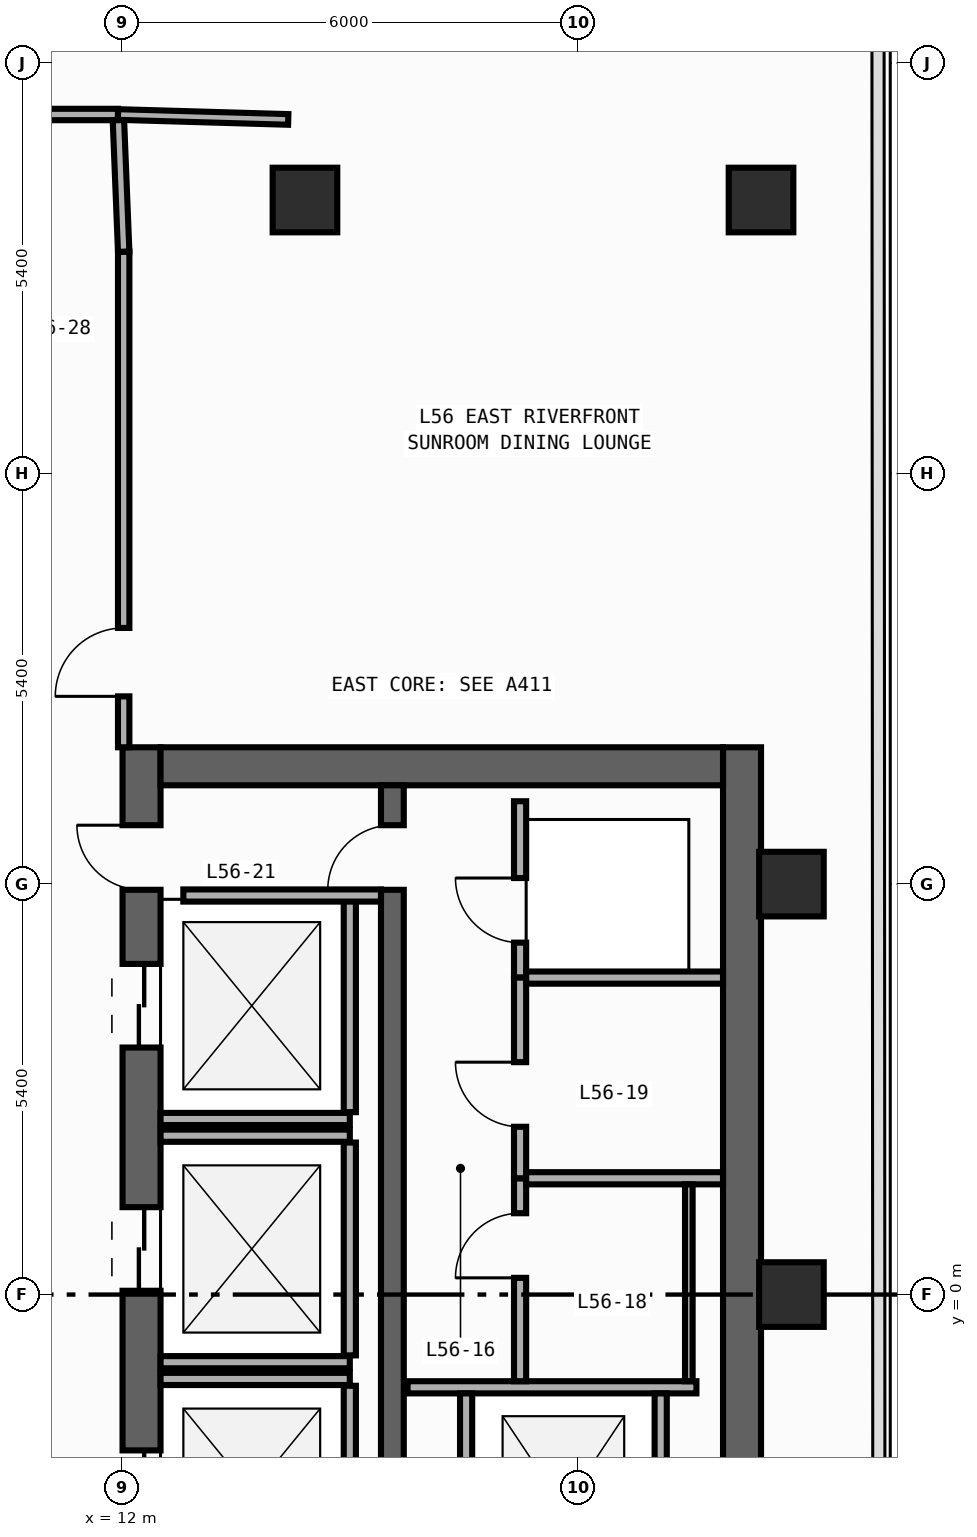
"""IFC4 building model, lengths in metres.
Left out: names, types, materials, properties, quantities, classifications, styles, units other than length and angle.
Written with IfcOpenShell. Run it as: python <this file> out.ifc"""

import sys

from ifc_helpers import new_model, si_unit, direction, frame, frame_2d, origin, origin_2d, place, context, subcontext, project, spatial, rectangle, extrude, element, fill, save


model = new_model("IFC4")
c1 = context("Model", 3, precision=1e-05, world=origin(), true_north=direction((0.0, 1.0)))
c2 = subcontext(c1, "Body", "Model", "MODEL_VIEW")
j1 = project(units=[si_unit("LENGTHUNIT", "METRE"), si_unit("PLANEANGLEUNIT", "RADIAN")], contexts=[c1])
p1 = place(None, origin())
s1 = spatial("IfcSite", under=j1, at=p1, CompositionType="ELEMENT")
p2 = place(p1, origin())
s2 = spatial("IfcBuilding", under=s1, at=p2, CompositionType="ELEMENT")
p3 = place(p2, frame((0.0, 0.0, 240.4)))
s3 = spatial("IfcBuildingStorey", under=s2, at=p3, CompositionType="ELEMENT", Elevation=240.4)
p4 = place(p3, frame((12.25, -19.8, 0.0), z_axis=(0.0, 0.0, 1.0), x_axis=(0.0, 1.0, 0.0)))
e1 = element("IfcWall", 1, at=p4, inside=s3, PredefinedType="SHEAR", context=c2, shape_type="SweptSolid", body=[
    extrude(rectangle(XDim=27.0, YDim=0.5, at=frame_2d((13.5, 0.0))), origin(), (0.0, 0.0, 1.0), 3.34),
])
p5 = place(p4, frame((23.05, 0.0, 0.0)))
e2 = element("IfcOpeningElement", 2, at=p5, cuts=e1, PredefinedType="OPENING", context=c2, shape_type="SweptSolid", body=[
    extrude(rectangle(XDim=1.1, YDim=2.2, at=frame_2d((0.55, 1.1))), frame((0.0, 0.26, 0.0), z_axis=(0.0, -1.0, 0.0), x_axis=(1.0, 0.0, 0.0)), (0.0, 0.0, 1.0), 0.52),
])
p6 = place(p4, frame((19.85, 0.0, 0.0)))
e3 = element("IfcOpeningElement", 3, at=p6, cuts=e1, PredefinedType="OPENING", context=c2, shape_type="SweptSolid", body=[
    extrude(rectangle(XDim=1.1, YDim=2.2, at=frame_2d((0.55, 1.1))), frame((0.0, 0.26, 0.0), z_axis=(0.0, -1.0, 0.0), x_axis=(1.0, 0.0, 0.0)), (0.0, 0.0, 1.0), 0.52),
])
p7 = place(p4, frame((16.65, 0.0, 0.0)))
e4 = element("IfcOpeningElement", 4, at=p7, cuts=e1, PredefinedType="OPENING", context=c2, shape_type="SweptSolid", body=[
    extrude(rectangle(XDim=1.1, YDim=2.2, at=frame_2d((0.55, 1.1))), frame((0.0, 0.26, 0.0), z_axis=(0.0, -1.0, 0.0), x_axis=(1.0, 0.0, 0.0)), (0.0, 0.0, 1.0), 0.52),
])
p8 = place(p4, frame((7.175, 0.0, 0.0)))
e5 = element("IfcOpeningElement", 5, at=p8, cuts=e1, PredefinedType="OPENING", context=c2, shape_type="SweptSolid", body=[
    extrude(rectangle(XDim=0.85, YDim=2.1, at=frame_2d((0.425, 1.05))), frame((0.0, 0.26, 0.0), z_axis=(0.0, -1.0, 0.0), x_axis=(1.0, 0.0, 0.0)), (0.0, 0.0, 1.0), 0.52),
])
p9 = place(p4, frame((10.375, 0.0, 0.0)))
e6 = element("IfcOpeningElement", 6, at=p9, cuts=e1, PredefinedType="OPENING", context=c2, shape_type="SweptSolid", body=[
    extrude(rectangle(XDim=0.85, YDim=2.1, at=frame_2d((0.425, 1.05))), frame((0.0, 0.26, 0.0), z_axis=(0.0, -1.0, 0.0), x_axis=(1.0, 0.0, 0.0)), (0.0, 0.0, 1.0), 0.52),
])
p10 = place(p4, frame((12.725, 0.0, 0.0)))
e7 = element("IfcOpeningElement", 7, at=p10, cuts=e1, PredefinedType="OPENING", context=c2, shape_type="SweptSolid", body=[
    extrude(rectangle(XDim=1.15, YDim=2.2, at=frame_2d((0.575, 1.1))), frame((0.0, 0.26, 0.0), z_axis=(0.0, -1.0, 0.0), x_axis=(1.0, 0.0, 0.0)), (0.0, 0.0, 1.0), 0.52),
])
p11 = place(p4, frame((25.125, 0.0, 0.0)))
e8 = element("IfcOpeningElement", 8, at=p11, cuts=e1, PredefinedType="OPENING", context=c2, shape_type="SweptSolid", body=[
    extrude(rectangle(XDim=0.85, YDim=2.1, at=frame_2d((0.425, 1.05))), frame((0.0, 0.26, 0.0), z_axis=(0.0, -1.0, 0.0), x_axis=(1.0, 0.0, 0.0)), (0.0, 0.0, 1.0), 0.52),
])
p12 = place(p3, frame((20.15, -19.8, 0.0), z_axis=(0.0, 0.0, 1.0), x_axis=(0.0, 1.0, 0.0)))
e9 = element("IfcWall", 9, at=p12, inside=s3, PredefinedType="SHEAR", context=c2, shape_type="SweptSolid", body=[
    extrude(rectangle(XDim=27.0, YDim=0.5, at=frame_2d((13.5, 0.0))), origin(), (0.0, 0.0, 1.0), 3.34),
])
p13 = place(p3, frame((12.5, 6.95, 0.0), z_axis=(0.0, 0.0, 1.0), x_axis=(1.0, 0.0, 0.0)))
e10 = element("IfcWall", 10, at=p13, inside=s3, PredefinedType="SHEAR", context=c2, shape_type="SweptSolid", body=[
    extrude(rectangle(XDim=7.4, YDim=0.5, at=frame_2d((3.7, 0.0))), origin(), (0.0, 0.0, 1.0), 3.34),
])
p14 = place(p3, frame((15.55, -19.3, 0.0), z_axis=(0.0, 0.0, 1.0), x_axis=(0.0, 1.0, 0.0)))
e11 = element("IfcWall", 11, at=p14, inside=s3, PredefinedType="SHEAR", context=c2, shape_type="SweptSolid", body=[
    extrude(rectangle(XDim=26.0, YDim=0.3, at=frame_2d((13.0, 0.0))), origin(), (0.0, 0.0, 1.0), 3.34),
])
p15 = place(p14, frame((12.225, 0.0, 0.0)))
e12 = element("IfcOpeningElement", 12, at=p15, cuts=e11, PredefinedType="OPENING", context=c2, shape_type="SweptSolid", body=[
    extrude(rectangle(XDim=1.15, YDim=2.2, at=frame_2d((0.575, 1.1))), frame((0.0, 0.16, 0.0), z_axis=(0.0, -1.0, 0.0), x_axis=(1.0, 0.0, 0.0)), (0.0, 0.0, 1.0), 0.32),
])
p16 = place(p14, frame((24.625, 0.0, 0.0)))
e13 = element("IfcOpeningElement", 13, at=p16, cuts=e11, PredefinedType="OPENING", context=c2, shape_type="SweptSolid", body=[
    extrude(rectangle(XDim=0.85, YDim=2.1, at=frame_2d((0.425, 1.05))), frame((0.0, 0.16, 0.0), z_axis=(0.0, -1.0, 0.0), x_axis=(1.0, 0.0, 0.0)), (0.0, 0.0, 1.0), 0.32),
])
for number, where, z_axis, x_axis in (
    (14, (20.4, 14.4, 0.0), (0.0, 0.0, 1.0), (1.0, 0.0, 0.0)),
    (15, (14.4, 14.4, 0.0), (0.0, 0.0, 1.0), (1.0, 0.0, 0.0)),
    (16, (20.8, 0.0, 0.0), (0.0, 0.0, 1.0), (1.0, 0.0, 0.0)),
    (17, (20.8, 5.4, 0.0), (0.0, 0.0, 1.0), (1.0, 0.0, 0.0)),
):
    element("IfcColumn", number, at=place(p3, frame(where, z_axis=z_axis, x_axis=x_axis)), inside=s3, PredefinedType="COLUMN", context=c2, shape_type="SweptSolid", body=[
        extrude(rectangle(XDim=0.85, YDim=0.85, at=origin_2d()), origin(), (0.0, 0.0, 1.0), 3.6),
    ])
p17 = place(p3, frame((12.5, 2.31, 0.0), z_axis=(0.0, 0.0, 1.0), x_axis=(1.0, 0.0, 0.0)))
e18 = element("IfcWall", 18, at=p17, inside=s3, PredefinedType="STANDARD", context=c2, shape_type="SweptSolid", body=[
    extrude(rectangle(XDim=2.49, YDim=0.16, at=frame_2d((1.245, 0.0))), origin(), (0.0, 0.0, 1.0), 3.34),
])
p18 = place(p3, frame((14.99, 2.4, 0.0), z_axis=(0.0, 0.0, 1.0), x_axis=(0.0, 1.0, 0.0)))
e19 = element("IfcWall", 19, at=p18, inside=s3, PredefinedType="STANDARD", context=c2, shape_type="SweptSolid", body=[
    extrude(rectangle(XDim=2.8, YDim=0.16, at=frame_2d((1.4, 0.0))), origin(), (0.0, 0.0, 1.0), 3.34),
])
for number, where, z_axis, x_axis in (
    (20, (12.5, -0.89, 0.0), (0.0, 0.0, 1.0), (1.0, 0.0, 0.0)),
    (21, (12.5, 2.09, 0.0), (0.0, 0.0, 1.0), (1.0, 0.0, 0.0)),
):
    element("IfcWall", number, at=place(p3, frame(where, z_axis=z_axis, x_axis=x_axis)), inside=s3, PredefinedType="STANDARD", context=c2, shape_type="SweptSolid", body=[
        extrude(rectangle(XDim=2.49, YDim=0.16, at=frame_2d((1.245, 0.0))), origin(), (0.0, 0.0, 1.0), 3.34),
    ])
p19 = place(p3, frame((14.99, -0.8, 0.0), z_axis=(0.0, 0.0, 1.0), x_axis=(0.0, 1.0, 0.0)))
e22 = element("IfcWall", 22, at=p19, inside=s3, PredefinedType="STANDARD", context=c2, shape_type="SweptSolid", body=[
    extrude(rectangle(XDim=2.8, YDim=0.16, at=frame_2d((1.4, 0.0))), origin(), (0.0, 0.0, 1.0), 3.34),
])
p20 = place(p3, frame((12.5, -1.11, 0.0), z_axis=(0.0, 0.0, 1.0), x_axis=(1.0, 0.0, 0.0)))
e23 = element("IfcWall", 23, at=p20, inside=s3, PredefinedType="STANDARD", context=c2, shape_type="SweptSolid", body=[
    extrude(rectangle(XDim=2.49, YDim=0.16, at=frame_2d((1.245, 0.0))), origin(), (0.0, 0.0, 1.0), 3.34),
])
p21 = place(p3, frame((14.99, -4.0, 0.0), z_axis=(0.0, 0.0, 1.0), x_axis=(0.0, 1.0, 0.0)))
e24 = element("IfcWall", 24, at=p21, inside=s3, PredefinedType="STANDARD", context=c2, shape_type="SweptSolid", body=[
    extrude(rectangle(XDim=2.8, YDim=0.16, at=frame_2d((1.4, 0.0))), origin(), (0.0, 0.0, 1.0), 3.34),
])
p22 = place(p3, frame((15.75, -1.22, 0.0), z_axis=(0.0, 0.0, 1.0), x_axis=(1.0, 0.0, 0.0)))
e25 = element("IfcWall", 25, at=p22, inside=s3, PredefinedType="STANDARD", context=c2, shape_type="SweptSolid", body=[
    extrude(rectangle(XDim=3.8, YDim=0.16, at=frame_2d((1.9, 0.0))), origin(), (0.0, 0.0, 1.0), 3.34),
])
for number, where, z_axis, x_axis in (
    (26, (16.52, -4.28, 0.0), (0.0, 0.0, 1.0), (0.0, 1.0, 0.0)),
    (27, (19.08, -4.28, 0.0), (0.0, 0.0, 1.0), (0.0, 1.0, 0.0)),
):
    element("IfcWall", number, at=place(p3, frame(where, z_axis=z_axis, x_axis=x_axis)), inside=s3, PredefinedType="STANDARD", context=c2, shape_type="SweptSolid", body=[
        extrude(rectangle(XDim=2.98, YDim=0.16, at=frame_2d((1.49, 0.0))), origin(), (0.0, 0.0, 1.0), 3.34),
    ])
p23 = place(p3, frame((12.8, 5.25, 0.0), z_axis=(0.0, 0.0, 1.0), x_axis=(1.0, 0.0, 0.0)))
e28 = element("IfcWall", 28, at=p23, inside=s3, PredefinedType="STANDARD", context=c2, shape_type="SweptSolid", body=[
    extrude(rectangle(XDim=2.6, YDim=0.16, at=frame_2d((1.3, 0.0))), origin(), (0.0, 0.0, 1.0), 3.34),
])
p24 = place(p3, frame((17.23, 4.17, 0.0), z_axis=(0.0, 0.0, 1.0), x_axis=(0.0, 1.0, 0.0)))
e29 = element("IfcWall", 29, at=p24, inside=s3, PredefinedType="PARTITIONING", context=c2, shape_type="SweptSolid", body=[
    extrude(rectangle(XDim=2.32, YDim=0.16, at=frame_2d((1.16, 0.0))), origin(), (0.0, 0.0, 1.0), 3.34),
])
p25 = place(p24, frame((0.46, 0.0, 0.0)))
e30 = element("IfcOpeningElement", 30, at=p25, cuts=e29, PredefinedType="OPENING", context=c2, shape_type="SweptSolid", body=[
    extrude(rectangle(XDim=0.85, YDim=2.1, at=frame_2d((0.425, 1.05))), frame((0.0, 0.09, 0.0), z_axis=(0.0, -1.0, 0.0), x_axis=(1.0, 0.0, 0.0)), (0.0, 0.0, 1.0), 0.18),
])
p26 = place(p3, frame((17.23, -1.14, 0.0), z_axis=(0.0, 0.0, 1.0), x_axis=(0.0, 1.0, 0.0)))
e31 = element("IfcWall", 31, at=p26, inside=s3, PredefinedType="PARTITIONING", context=c2, shape_type="SweptSolid", body=[
    extrude(rectangle(XDim=2.67, YDim=0.16, at=frame_2d((1.335, 0.0))), origin(), (0.0, 0.0, 1.0), 3.34),
])
p27 = place(p26, frame((1.36, 0.0, 0.0)))
e32 = element("IfcOpeningElement", 32, at=p27, cuts=e31, PredefinedType="OPENING", context=c2, shape_type="SweptSolid", body=[
    extrude(rectangle(XDim=0.85, YDim=2.1, at=frame_2d((0.425, 1.05))), frame((0.0, 0.09, 0.0), z_axis=(0.0, -1.0, 0.0), x_axis=(1.0, 0.0, 0.0)), (0.0, 0.0, 1.0), 0.18),
])
p28 = place(p3, frame((17.23, 1.53, 0.0), z_axis=(0.0, 0.0, 1.0), x_axis=(0.0, 1.0, 0.0)))
e33 = element("IfcWall", 33, at=p28, inside=s3, PredefinedType="PARTITIONING", context=c2, shape_type="SweptSolid", body=[
    extrude(rectangle(XDim=2.64, YDim=0.16, at=frame_2d((1.32, 0.0))), origin(), (0.0, 0.0, 1.0), 3.34),
])
p29 = place(p28, frame((0.677, 0.0, 0.0)))
e34 = element("IfcOpeningElement", 34, at=p29, cuts=e33, PredefinedType="OPENING", context=c2, shape_type="SweptSolid", body=[
    extrude(rectangle(XDim=0.85, YDim=2.1, at=frame_2d((0.425, 1.05))), frame((0.0, 0.09, 0.0), z_axis=(0.0, -1.0, 0.0), x_axis=(1.0, 0.0, 0.0)), (0.0, 0.0, 1.0), 0.18),
])
for number, where, z_axis, x_axis in (
    (35, (17.31, 4.17, 0.0), (0.0, 0.0, 1.0), (1.0, 0.0, 0.0)),
    (36, (17.31, 1.53, 0.0), (0.0, 0.0, 1.0), (1.0, 0.0, 0.0)),
):
    element("IfcWall", number, at=place(p3, frame(where, z_axis=z_axis, x_axis=x_axis)), inside=s3, PredefinedType="PARTITIONING", context=c2, shape_type="SweptSolid", body=[
        extrude(rectangle(XDim=2.59, YDim=0.16, at=frame_2d((1.295, 0.0))), origin(), (0.0, 0.0, 1.0), 3.34),
    ])
p30 = place(p3, frame((12.015, 7.2, 0.0), z_axis=(0.0, 0.0, 1.0), x_axis=(0.0, 1.0, 0.0)))
e37 = element("IfcWall", 37, at=p30, inside=s3, PredefinedType="PARTITIONING", context=c2, shape_type="SweptSolid", body=[
    extrude(rectangle(XDim=6.52, YDim=0.15, at=frame_2d((3.26, 0.0))), origin(), (0.0, 0.0, 1.0), 3.34),
])
p31 = place(p30, frame((0.67, 0.0, 0.0)))
e38 = element("IfcOpeningElement", 38, at=p31, cuts=e37, PredefinedType="OPENING", context=c2, shape_type="SweptSolid", body=[
    extrude(rectangle(XDim=0.9, YDim=2.15, at=frame_2d((0.45, 1.075))), frame((0.0, 0.085, 0.0), z_axis=(0.0, -1.0, 0.0), x_axis=(1.0, 0.0, 0.0)), (0.0, 0.0, 1.0), 0.17),
])
p32 = place(p3, frame((4.105, 15.525, 0.0), z_axis=(0.0, 0.0, 1.0), x_axis=(1.0, 0.0, 0.0)))
e39 = element("IfcWall", 39, at=p32, inside=s3, PredefinedType="PARTITIONING", context=c2, shape_type="SweptSolid", body=[
    extrude(rectangle(XDim=7.835, YDim=0.15, at=frame_2d((3.917, 0.0))), origin(), (0.0, 0.0, 1.0), 3.34),
])
p33 = place(p3, frame((12.015, 13.72, 0.0), z_axis=(0.0, 0.0, 1.0), x_axis=(-0.040046877756, 0.99919780203, 0.0)))
e40 = element("IfcWall", 40, at=p33, inside=s3, PredefinedType="PARTITIONING", context=c2, shape_type="SweptSolid", body=[
    extrude(rectangle(XDim=1.731, YDim=0.15, at=frame_2d((0.866, 0.0))), origin(), (0.0, 0.0, 1.0), 3.34),
])
p34 = place(p3, frame((11.94, 15.525, 0.0), z_axis=(0.0, 0.0, 1.0), x_axis=(0.99958000177, -0.028979649098, 0.0)))
e41 = element("IfcWall", 41, at=p34, inside=s3, PredefinedType="PARTITIONING", context=c2, shape_type="SweptSolid", body=[
    extrude(rectangle(XDim=2.241, YDim=0.14, at=frame_2d((1.121, 0.0))), origin(), (0.0, 0.0, 1.0), 3.34),
])
p35 = place(p3, frame((19.45, 1.45, 0.0), z_axis=(0.0, 0.0, 1.0), x_axis=(0.0, -1.0, 0.0)))
e42 = element("IfcWall", 42, at=p35, inside=s3, PredefinedType="PARTITIONING", context=c2, shape_type="SweptSolid", body=[
    extrude(rectangle(XDim=2.59, YDim=0.1, at=frame_2d((1.295, 0.0))), origin(), (0.0, 0.0, 1.0), 3.34),
])
p36 = place(p5, origin())
e43 = element("IfcDoor", 43, at=p36, inside=s3, OperationType="DOUBLE_DOOR_SLIDING", PredefinedType="DOOR", context=c2, shape_type="SweptSolid", body=[
    extrude(rectangle(XDim=1.1, YDim=2.2, at=frame_2d((0.55, 1.1))), frame((0.0, 0.025, 0.0), z_axis=(0.0, -1.0, 0.0), x_axis=(1.0, 0.0, 0.0)), (0.0, 0.0, 1.0), 0.05),
])
fill(e2, e43)
p37 = place(p6, origin())
e44 = element("IfcDoor", 44, at=p37, inside=s3, OperationType="DOUBLE_DOOR_SLIDING", PredefinedType="DOOR", context=c2, shape_type="SweptSolid", body=[
    extrude(rectangle(XDim=1.1, YDim=2.2, at=frame_2d((0.55, 1.1))), frame((0.0, 0.025, 0.0), z_axis=(0.0, -1.0, 0.0), x_axis=(1.0, 0.0, 0.0)), (0.0, 0.0, 1.0), 0.05),
])
fill(e3, e44)
p38 = place(p7, origin())
e45 = element("IfcDoor", 45, at=p38, inside=s3, OperationType="DOUBLE_DOOR_SLIDING", PredefinedType="DOOR", context=c2, shape_type="SweptSolid", body=[
    extrude(rectangle(XDim=1.1, YDim=2.2, at=frame_2d((0.55, 1.1))), frame((0.0, 0.025, 0.0), z_axis=(0.0, -1.0, 0.0), x_axis=(1.0, 0.0, 0.0)), (0.0, 0.0, 1.0), 0.05),
])
fill(e4, e45)
p39 = place(p11, origin())
e46 = element("IfcDoor", 46, at=p39, inside=s3, OperationType="SINGLE_SWING_RIGHT", PredefinedType="DOOR", context=c2, shape_type="SweptSolid", body=[
    extrude(rectangle(XDim=0.85, YDim=2.1, at=frame_2d((0.425, 1.05))), frame((0.0, 0.025, 0.0), z_axis=(0.0, -1.0, 0.0), x_axis=(1.0, 0.0, 0.0)), (0.0, 0.0, 1.0), 0.05),
])
fill(e8, e46)
p40 = place(p16, origin())
e47 = element("IfcDoor", 47, at=p40, inside=s3, OperationType="SINGLE_SWING_LEFT", PredefinedType="DOOR", context=c2, shape_type="SweptSolid", body=[
    extrude(rectangle(XDim=0.85, YDim=2.1, at=frame_2d((0.425, 1.05))), frame((0.0, 0.025, 0.0), z_axis=(0.0, -1.0, 0.0), x_axis=(1.0, 0.0, 0.0)), (0.0, 0.0, 1.0), 0.05),
])
fill(e13, e47)
p41 = place(p25, origin())
e48 = element("IfcDoor", 48, at=p41, inside=s3, OperationType="SINGLE_SWING_RIGHT", PredefinedType="DOOR", context=c2, shape_type="SweptSolid", body=[
    extrude(rectangle(XDim=0.85, YDim=2.1, at=frame_2d((0.425, 1.05))), frame((0.0, 0.025, 0.0), z_axis=(0.0, -1.0, 0.0), x_axis=(1.0, 0.0, 0.0)), (0.0, 0.0, 1.0), 0.05),
])
fill(e30, e48)
p42 = place(p27, origin())
e49 = element("IfcDoor", 49, at=p42, inside=s3, OperationType="SINGLE_SWING_LEFT", PredefinedType="DOOR", context=c2, shape_type="SweptSolid", body=[
    extrude(rectangle(XDim=0.85, YDim=2.1, at=frame_2d((0.425, 1.05))), frame((0.0, 0.025, 0.0), z_axis=(0.0, -1.0, 0.0), x_axis=(1.0, 0.0, 0.0)), (0.0, 0.0, 1.0), 0.05),
])
fill(e32, e49)
p43 = place(p29, origin())
e50 = element("IfcDoor", 50, at=p43, inside=s3, OperationType="SINGLE_SWING_RIGHT", PredefinedType="DOOR", context=c2, shape_type="SweptSolid", body=[
    extrude(rectangle(XDim=0.85, YDim=2.1, at=frame_2d((0.425, 1.05))), frame((0.0, 0.025, 0.0), z_axis=(0.0, -1.0, 0.0), x_axis=(1.0, 0.0, 0.0)), (0.0, 0.0, 1.0), 0.05),
])
fill(e34, e50)
p44 = place(p31, origin())
e51 = element("IfcDoor", 51, at=p44, inside=s3, OperationType="SINGLE_SWING_LEFT", PredefinedType="DOOR", context=c2, shape_type="SweptSolid", body=[
    extrude(rectangle(XDim=0.9, YDim=2.15, at=frame_2d((0.45, 1.075))), frame((0.0, 0.025, 0.0), z_axis=(0.0, -1.0, 0.0), x_axis=(1.0, 0.0, 0.0)), (0.0, 0.0, 1.0), 0.05),
])
fill(e38, e51)
save(model, sys.argv[1])
